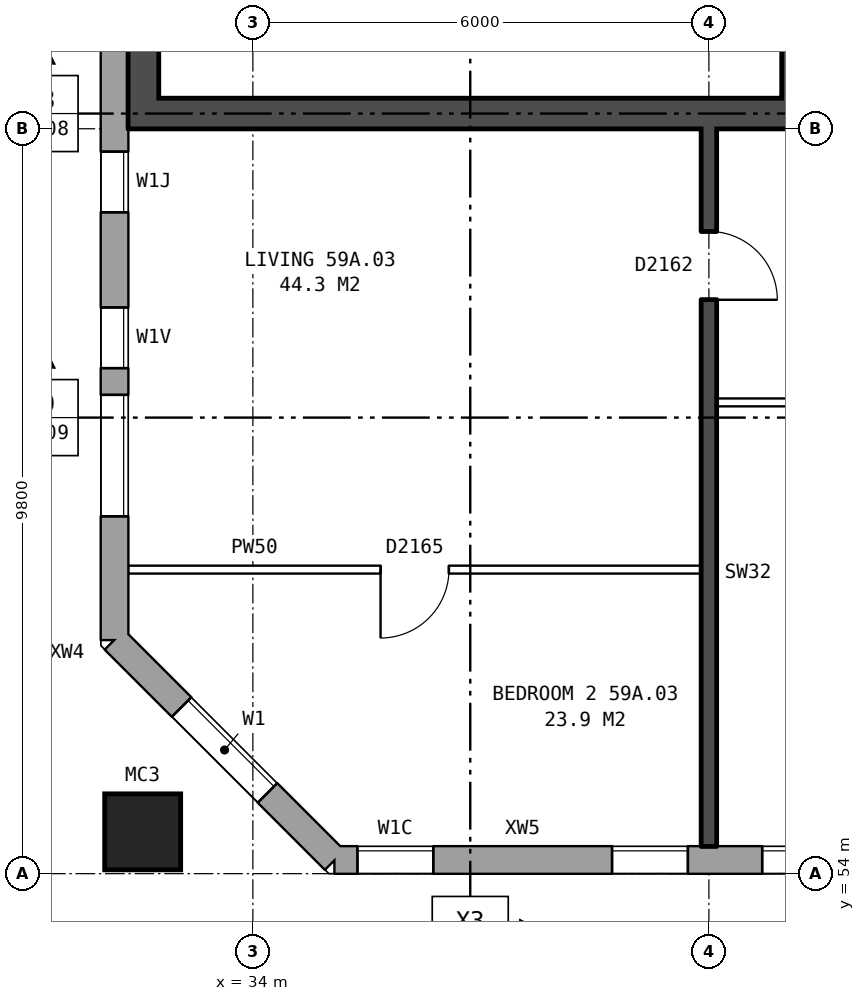
"""IFC4 building model, lengths in metres.
Left out: names, types, materials, properties, quantities, classifications, styles, units other than length and angle.
Written with IfcOpenShell. Run it as: python <this file> out.ifc"""

import sys

from ifc_helpers import new_model, si_unit, direction, frame, frame_2d, origin, origin_2d, place, context, subcontext, project, spatial, rectangle, hollow_rectangle, extrude, element, fill, save


model = new_model("IFC4")
c1 = context("Model", 3, precision=1e-05, world=origin(), true_north=direction((0.0, 1.0)))
c2 = subcontext(c1, "Body", "Model", "MODEL_VIEW")
j1 = project(units=[si_unit("LENGTHUNIT", "METRE"), si_unit("PLANEANGLEUNIT", "RADIAN")], contexts=[c1])
p1 = place(None, origin())
s1 = spatial("IfcSite", under=j1, at=p1, CompositionType="ELEMENT")
p2 = place(p1, origin())
s2 = spatial("IfcBuilding", under=s1, at=p2, CompositionType="ELEMENT")
p3 = place(p2, frame((0.0, 0.0, 209.0)))
s3 = spatial("IfcBuildingStorey", under=s2, at=p3, CompositionType="ELEMENT", Elevation=209.0)
p4 = place(p3, frame((32.55, 54.55, 0.0), z_axis=(0.0, 0.0, 1.0), x_axis=(1.0, 0.0, 0.0)))
e1 = element("IfcColumn", 1, at=p4, inside=s3, PredefinedType="COLUMN", context=c2, shape_type="SweptSolid", body=[
    extrude(hollow_rectangle(XDim=1.0, YDim=1.0, WallThickness=0.055, at=origin_2d()), origin(), (0.0, 0.0, 1.0), 3.1),
])
p5 = place(p3, frame((32.18, 57.075, 0.0), z_axis=(0.0, 0.0, 1.0), x_axis=(0.707106781187, -0.707106781187, 0.0)))
e2 = element("IfcWall", 2, at=p5, inside=s3, PredefinedType="STANDARD", context=c2, shape_type="SweptSolid", body=[
    extrude(rectangle(XDim=4.094, YDim=0.36, at=frame_2d((2.047, 0.0))), origin(), (0.0, 0.0, 1.0), 2.85),
])
p6 = place(p5, frame((1.247, 0.0, 0.8)))
e3 = element("IfcOpeningElement", 3, at=p6, cuts=e2, PredefinedType="OPENING", context=c2, shape_type="SweptSolid", body=[
    extrude(rectangle(XDim=1.6, YDim=1.8, at=frame_2d((0.8, 0.9))), frame((0.0, 0.19, 0.0), z_axis=(0.0, -1.0, 0.0), x_axis=(1.0, 0.0, 0.0)), (0.0, 0.0, 1.0), 0.38),
])
p7 = place(p3, frame((35.075, 54.18, 0.0), z_axis=(0.0, 0.0, 1.0), x_axis=(1.0, 0.0, 0.0)))
e4 = element("IfcWall", 4, at=p7, inside=s3, PredefinedType="STANDARD", context=c2, shape_type="SweptSolid", body=[
    extrude(rectangle(XDim=39.875, YDim=0.36, at=frame_2d((19.938, 0.0))), origin(), (0.0, 0.0, 1.0), 2.85),
])
p8 = place(p7, frame((0.3, 0.0, 0.8)))
e5 = element("IfcOpeningElement", 5, at=p8, cuts=e4, PredefinedType="OPENING", context=c2, shape_type="SweptSolid", body=[
    extrude(rectangle(XDim=1.0, YDim=1.8, at=frame_2d((0.5, 0.9))), frame((0.0, 0.19, 0.0), z_axis=(0.0, -1.0, 0.0), x_axis=(1.0, 0.0, 0.0)), (0.0, 0.0, 1.0), 0.38),
])
p9 = place(p7, frame((5.625, 0.0, 0.8)))
e6 = element("IfcOpeningElement", 6, at=p9, cuts=e4, PredefinedType="OPENING", context=c2, shape_type="SweptSolid", body=[
    extrude(rectangle(XDim=1.6, YDim=1.8, at=frame_2d((0.8, 0.9))), frame((0.0, 0.19, 0.0), z_axis=(0.0, -1.0, 0.0), x_axis=(1.0, 0.0, 0.0)), (0.0, 0.0, 1.0), 0.38),
])
p10 = place(p7, frame((8.625, 0.0, 0.8)))
e7 = element("IfcOpeningElement", 7, at=p10, cuts=e4, PredefinedType="OPENING", context=c2, shape_type="SweptSolid", body=[
    extrude(rectangle(XDim=1.6, YDim=1.8, at=frame_2d((0.8, 0.9))), frame((0.0, 0.19, 0.0), z_axis=(0.0, -1.0, 0.0), x_axis=(1.0, 0.0, 0.0)), (0.0, 0.0, 1.0), 0.38),
])
p11 = place(p7, frame((11.625, 0.0, 0.8)))
e8 = element("IfcOpeningElement", 8, at=p11, cuts=e4, PredefinedType="OPENING", context=c2, shape_type="SweptSolid", body=[
    extrude(rectangle(XDim=1.6, YDim=1.8, at=frame_2d((0.8, 0.9))), frame((0.0, 0.19, 0.0), z_axis=(0.0, -1.0, 0.0), x_axis=(1.0, 0.0, 0.0)), (0.0, 0.0, 1.0), 0.38),
])
p12 = place(p7, frame((14.625, 0.0, 0.8)))
e9 = element("IfcOpeningElement", 9, at=p12, cuts=e4, PredefinedType="OPENING", context=c2, shape_type="SweptSolid", body=[
    extrude(rectangle(XDim=1.6, YDim=1.8, at=frame_2d((0.8, 0.9))), frame((0.0, 0.19, 0.0), z_axis=(0.0, -1.0, 0.0), x_axis=(1.0, 0.0, 0.0)), (0.0, 0.0, 1.0), 0.38),
])
p13 = place(p7, frame((17.625, 0.0, 0.8)))
e10 = element("IfcOpeningElement", 10, at=p13, cuts=e4, PredefinedType="OPENING", context=c2, shape_type="SweptSolid", body=[
    extrude(rectangle(XDim=1.6, YDim=1.8, at=frame_2d((0.8, 0.9))), frame((0.0, 0.19, 0.0), z_axis=(0.0, -1.0, 0.0), x_axis=(1.0, 0.0, 0.0)), (0.0, 0.0, 1.0), 0.38),
])
p14 = place(p7, frame((20.625, 0.0, 0.8)))
e11 = element("IfcOpeningElement", 11, at=p14, cuts=e4, PredefinedType="OPENING", context=c2, shape_type="SweptSolid", body=[
    extrude(rectangle(XDim=1.6, YDim=1.8, at=frame_2d((0.8, 0.9))), frame((0.0, 0.19, 0.0), z_axis=(0.0, -1.0, 0.0), x_axis=(1.0, 0.0, 0.0)), (0.0, 0.0, 1.0), 0.38),
])
p15 = place(p7, frame((23.625, 0.0, 0.8)))
e12 = element("IfcOpeningElement", 12, at=p15, cuts=e4, PredefinedType="OPENING", context=c2, shape_type="SweptSolid", body=[
    extrude(rectangle(XDim=1.6, YDim=1.8, at=frame_2d((0.8, 0.9))), frame((0.0, 0.19, 0.0), z_axis=(0.0, -1.0, 0.0), x_axis=(1.0, 0.0, 0.0)), (0.0, 0.0, 1.0), 0.38),
])
p16 = place(p7, frame((26.625, 0.0, 0.8)))
e13 = element("IfcOpeningElement", 13, at=p16, cuts=e4, PredefinedType="OPENING", context=c2, shape_type="SweptSolid", body=[
    extrude(rectangle(XDim=1.6, YDim=1.8, at=frame_2d((0.8, 0.9))), frame((0.0, 0.19, 0.0), z_axis=(0.0, -1.0, 0.0), x_axis=(1.0, 0.0, 0.0)), (0.0, 0.0, 1.0), 0.38),
])
p17 = place(p7, frame((29.625, 0.0, 0.8)))
e14 = element("IfcOpeningElement", 14, at=p17, cuts=e4, PredefinedType="OPENING", context=c2, shape_type="SweptSolid", body=[
    extrude(rectangle(XDim=1.6, YDim=1.8, at=frame_2d((0.8, 0.9))), frame((0.0, 0.19, 0.0), z_axis=(0.0, -1.0, 0.0), x_axis=(1.0, 0.0, 0.0)), (0.0, 0.0, 1.0), 0.38),
])
p18 = place(p7, frame((32.625, 0.0, 0.8)))
e15 = element("IfcOpeningElement", 15, at=p18, cuts=e4, PredefinedType="OPENING", context=c2, shape_type="SweptSolid", body=[
    extrude(rectangle(XDim=1.6, YDim=1.8, at=frame_2d((0.8, 0.9))), frame((0.0, 0.19, 0.0), z_axis=(0.0, -1.0, 0.0), x_axis=(1.0, 0.0, 0.0)), (0.0, 0.0, 1.0), 0.38),
])
p19 = place(p7, frame((36.325, 0.0, 1.1)))
e16 = element("IfcOpeningElement", 16, at=p19, cuts=e4, PredefinedType="OPENING", context=c2, shape_type="SweptSolid", body=[
    extrude(rectangle(XDim=0.8, YDim=1.5, at=frame_2d((0.4, 0.75))), frame((0.0, 0.19, 0.0), z_axis=(0.0, -1.0, 0.0), x_axis=(1.0, 0.0, 0.0)), (0.0, 0.0, 1.0), 0.38),
])
p20 = place(p7, frame((3.65, 0.0, 0.8)))
e17 = element("IfcOpeningElement", 17, at=p20, cuts=e4, PredefinedType="OPENING", context=c2, shape_type="SweptSolid", body=[
    extrude(rectangle(XDim=1.0, YDim=1.8, at=frame_2d((0.5, 0.9))), frame((0.0, 0.19, 0.0), z_axis=(0.0, -1.0, 0.0), x_axis=(1.0, 0.0, 0.0)), (0.0, 0.0, 1.0), 0.38),
])
p21 = place(p7, frame((37.425, 0.0, 0.8)))
e18 = element("IfcOpeningElement", 18, at=p21, cuts=e4, PredefinedType="OPENING", context=c2, shape_type="SweptSolid", body=[
    extrude(rectangle(XDim=1.4, YDim=1.8, at=frame_2d((0.7, 0.9))), frame((0.0, 0.19, 0.0), z_axis=(0.0, -1.0, 0.0), x_axis=(1.0, 0.0, 0.0)), (0.0, 0.0, 1.0), 0.38),
])
p22 = place(p3, frame((32.18, 82.925, 0.0), z_axis=(0.0, 0.0, 1.0), x_axis=(0.0, -1.0, 0.0)))
e19 = element("IfcWall", 19, at=p22, inside=s3, PredefinedType="STANDARD", context=c2, shape_type="SweptSolid", body=[
    extrude(rectangle(XDim=25.851, YDim=0.36, at=frame_2d((12.925, 0.0))), origin(), (0.0, 0.0, 1.0), 2.85),
])
p23 = place(p22, frame((1.625, 0.0, 0.8)))
e20 = element("IfcOpeningElement", 20, at=p23, cuts=e19, PredefinedType="OPENING", context=c2, shape_type="SweptSolid", body=[
    extrude(rectangle(XDim=1.6, YDim=1.8, at=frame_2d((0.8, 0.9))), frame((0.0, 0.19, 0.0), z_axis=(0.0, -1.0, 0.0), x_axis=(1.0, 0.0, 0.0)), (0.0, 0.0, 1.0), 0.38),
])
p24 = place(p22, frame((4.475, 0.0, 0.15)))
e21 = element("IfcOpeningElement", 21, at=p24, cuts=e19, PredefinedType="OPENING", context=c2, shape_type="SweptSolid", body=[
    extrude(rectangle(XDim=0.6, YDim=0.9, at=frame_2d((0.3, 0.45))), frame((0.0, 0.19, 0.0), z_axis=(0.0, -1.0, 0.0), x_axis=(1.0, 0.0, 0.0)), (0.0, 0.0, 1.0), 0.38),
])
p25 = place(p22, frame((19.425, 0.0, 0.8)))
e22 = element("IfcOpeningElement", 22, at=p25, cuts=e19, PredefinedType="OPENING", context=c2, shape_type="SweptSolid", body=[
    extrude(rectangle(XDim=0.8, YDim=1.5, at=frame_2d((0.4, 0.75))), frame((0.0, 0.19, 0.0), z_axis=(0.0, -1.0, 0.0), x_axis=(1.0, 0.0, 0.0)), (0.0, 0.0, 1.0), 0.38),
])
p26 = place(p22, frame((22.625, 0.0, 0.8)))
e23 = element("IfcOpeningElement", 23, at=p26, cuts=e19, PredefinedType="OPENING", context=c2, shape_type="SweptSolid", body=[
    extrude(rectangle(XDim=1.6, YDim=1.8, at=frame_2d((0.8, 0.9))), frame((0.0, 0.19, 0.0), z_axis=(0.0, -1.0, 0.0), x_axis=(1.0, 0.0, 0.0)), (0.0, 0.0, 1.0), 0.38),
])
p27 = place(p22, frame((5.375, 0.0, 0.15)))
e24 = element("IfcOpeningElement", 24, at=p27, cuts=e19, PredefinedType="OPENING", context=c2, shape_type="SweptSolid", body=[
    extrude(rectangle(XDim=1.0, YDim=1.8, at=frame_2d((0.5, 0.9))), frame((0.0, 0.19, 0.0), z_axis=(0.0, -1.0, 0.0), x_axis=(1.0, 0.0, 0.0)), (0.0, 0.0, 1.0), 0.38),
])
p28 = place(p22, frame((21.475, 0.0, 1.7)))
e25 = element("IfcOpeningElement", 25, at=p28, cuts=e19, PredefinedType="OPENING", context=c2, shape_type="SweptSolid", body=[
    extrude(rectangle(XDim=0.8, YDim=0.9, at=frame_2d((0.4, 0.45))), frame((0.0, 0.19, 0.0), z_axis=(0.0, -1.0, 0.0), x_axis=(1.0, 0.0, 0.0)), (0.0, 0.0, 1.0), 0.38),
])
p29 = place(p3, frame((41.16, 76.2, 0.0), z_axis=(0.0, 0.0, 1.0), x_axis=(0.0, -1.0, 0.0)))
e26 = element("IfcWall", 26, at=p29, inside=s3, PredefinedType="SHEAR", context=c2, shape_type="SweptSolid", body=[
    extrude(rectangle(XDim=12.4, YDim=0.4, at=frame_2d((6.2, 0.0))), origin(), (0.0, 0.0, 1.0), 2.85),
])
p30 = place(p29, frame((1.325, 0.0, 0.0)))
e27 = element("IfcOpeningElement", 27, at=p30, cuts=e26, PredefinedType="OPENING", context=c2, shape_type="SweptSolid", body=[
    extrude(rectangle(XDim=1.1, YDim=2.1, at=frame_2d((0.55, 1.05))), frame((0.0, 0.21, 0.0), z_axis=(0.0, -1.0, 0.0), x_axis=(1.0, 0.0, 0.0)), (0.0, 0.0, 1.0), 0.42),
])
p31 = place(p29, frame((4.575, 0.0, 0.0)))
e28 = element("IfcOpeningElement", 28, at=p31, cuts=e26, PredefinedType="OPENING", context=c2, shape_type="SweptSolid", body=[
    extrude(rectangle(XDim=0.85, YDim=2.1, at=frame_2d((0.425, 1.05))), frame((0.0, 0.21, 0.0), z_axis=(0.0, -1.0, 0.0), x_axis=(1.0, 0.0, 0.0)), (0.0, 0.0, 1.0), 0.42),
])
p32 = place(p29, frame((7.825, 0.0, 0.0)))
e29 = element("IfcOpeningElement", 29, at=p32, cuts=e26, PredefinedType="OPENING", context=c2, shape_type="SweptSolid", body=[
    extrude(rectangle(XDim=0.85, YDim=2.1, at=frame_2d((0.425, 1.05))), frame((0.0, 0.21, 0.0), z_axis=(0.0, -1.0, 0.0), x_axis=(1.0, 0.0, 0.0)), (0.0, 0.0, 1.0), 0.42),
])
p33 = place(p29, frame((9.9, 0.0, 0.0)))
e30 = element("IfcOpeningElement", 30, at=p33, cuts=e26, PredefinedType="OPENING", context=c2, shape_type="SweptSolid", body=[
    extrude(rectangle(XDim=1.1, YDim=2.1, at=frame_2d((0.55, 1.05))), frame((0.0, 0.21, 0.0), z_axis=(0.0, -1.0, 0.0), x_axis=(1.0, 0.0, 0.0)), (0.0, 0.0, 1.0), 0.42),
])
p34 = place(p3, frame((32.56, 76.2, 0.0), z_axis=(0.0, 0.0, 1.0), x_axis=(0.0, -1.0, 0.0)))
e31 = element("IfcWall", 31, at=p34, inside=s3, PredefinedType="SHEAR", context=c2, shape_type="SweptSolid", body=[
    extrude(rectangle(XDim=12.4, YDim=0.4, at=frame_2d((6.2, 0.0))), origin(), (0.0, 0.0, 1.0), 2.85),
])
p35 = place(p3, frame((40.96, 64.0, 0.0), z_axis=(0.0, 0.0, 1.0), x_axis=(-1.0, 0.0, 0.0)))
e32 = element("IfcWall", 32, at=p35, inside=s3, PredefinedType="SHEAR", context=c2, shape_type="SweptSolid", body=[
    extrude(rectangle(XDim=8.2, YDim=0.4, at=frame_2d((4.1, 0.0))), origin(), (0.0, 0.0, 1.0), 2.85),
])
p36 = place(p3, frame((32.36, 58.0, 0.0), z_axis=(0.0, 0.0, 1.0), x_axis=(1.0, 0.0, 0.0)))
e33 = element("IfcWall", 33, at=p36, inside=s3, PredefinedType="PARTITIONING", context=c2, shape_type="SweptSolid", body=[
    extrude(rectangle(XDim=7.54, YDim=0.1, at=frame_2d((3.77, 0.0))), origin(), (0.0, 0.0, 1.0), 2.85),
])
p37 = place(p36, frame((3.32, 0.0, 0.0)))
e34 = element("IfcOpeningElement", 34, at=p37, cuts=e33, PredefinedType="OPENING", context=c2, shape_type="SweptSolid", body=[
    extrude(rectangle(XDim=0.9, YDim=2.1, at=frame_2d((0.45, 1.05))), frame((0.0, 0.06, 0.0), z_axis=(0.0, -1.0, 0.0), x_axis=(1.0, 0.0, 0.0)), (0.0, 0.0, 1.0), 0.12),
])
p38 = place(p3, frame((40.1, 60.2, 0.0), z_axis=(0.0, 0.0, 1.0), x_axis=(1.0, 0.0, 0.0)))
e35 = element("IfcWall", 35, at=p38, inside=s3, PredefinedType="PARTITIONING", context=c2, shape_type="SweptSolid", body=[
    extrude(rectangle(XDim=5.8, YDim=0.1, at=frame_2d((2.9, 0.0))), origin(), (0.0, 0.0, 1.0), 2.85),
])
p39 = place(p38, frame((1.3, 0.0, 0.0)))
e36 = element("IfcOpeningElement", 36, at=p39, cuts=e35, PredefinedType="OPENING", context=c2, shape_type="SweptSolid", body=[
    extrude(rectangle(XDim=0.9, YDim=2.1, at=frame_2d((0.45, 1.05))), frame((0.0, 0.06, 0.0), z_axis=(0.0, -1.0, 0.0), x_axis=(1.0, 0.0, 0.0)), (0.0, 0.0, 1.0), 0.12),
])
p40 = place(p38, frame((4.2, 0.0, 0.0)))
e37 = element("IfcOpeningElement", 37, at=p40, cuts=e35, PredefinedType="OPENING", context=c2, shape_type="SweptSolid", body=[
    extrude(rectangle(XDim=0.9, YDim=2.1, at=frame_2d((0.45, 1.05))), frame((0.0, 0.06, 0.0), z_axis=(0.0, -1.0, 0.0), x_axis=(1.0, 0.0, 0.0)), (0.0, 0.0, 1.0), 0.12),
])
p41 = place(p3, frame((40.0, 54.36, 0.0), z_axis=(0.0, 0.0, 1.0), x_axis=(0.0, 1.0, 0.0)))
e38 = element("IfcWall", 38, at=p41, inside=s3, PredefinedType="SOLIDWALL", context=c2, shape_type="SweptSolid", body=[
    extrude(rectangle(XDim=9.44, YDim=0.2, at=frame_2d((4.72, 0.0))), origin(), (0.0, 0.0, 1.0), 2.85),
])
p42 = place(p41, frame((7.19, 0.0, 0.0)))
e39 = element("IfcOpeningElement", 39, at=p42, cuts=e38, PredefinedType="OPENING", context=c2, shape_type="SweptSolid", body=[
    extrude(rectangle(XDim=0.9, YDim=2.1, at=frame_2d((0.45, 1.05))), frame((0.0, 0.11, 0.0), z_axis=(0.0, -1.0, 0.0), x_axis=(1.0, 0.0, 0.0)), (0.0, 0.0, 1.0), 0.22),
])
p43 = place(p6, origin())
e40 = element("IfcWindow", 40, at=p43, inside=s3, PartitioningType="SINGLE_PANEL", PredefinedType="WINDOW", context=c2, shape_type="SweptSolid", body=[
    extrude(rectangle(XDim=1.6, YDim=1.8, at=frame_2d((0.8, 0.9))), frame((0.0, 0.15, 0.0), z_axis=(0.0, -1.0, 0.0), x_axis=(1.0, 0.0, 0.0)), (0.0, 0.0, 1.0), 0.06),
])
fill(e3, e40)
p44 = place(p8, origin())
e41 = element("IfcWindow", 41, at=p44, inside=s3, PartitioningType="SINGLE_PANEL", PredefinedType="WINDOW", context=c2, shape_type="SweptSolid", body=[
    extrude(rectangle(XDim=1.0, YDim=1.8, at=frame_2d((0.5, 0.9))), frame((0.0, 0.15, 0.0), z_axis=(0.0, -1.0, 0.0), x_axis=(1.0, 0.0, 0.0)), (0.0, 0.0, 1.0), 0.06),
])
fill(e5, e41)
p45 = place(p9, origin())
e42 = element("IfcWindow", 42, at=p45, inside=s3, PartitioningType="SINGLE_PANEL", PredefinedType="WINDOW", context=c2, shape_type="SweptSolid", body=[
    extrude(rectangle(XDim=1.6, YDim=1.8, at=frame_2d((0.8, 0.9))), frame((0.0, 0.15, 0.0), z_axis=(0.0, -1.0, 0.0), x_axis=(1.0, 0.0, 0.0)), (0.0, 0.0, 1.0), 0.06),
])
fill(e6, e42)
p46 = place(p25, origin())
e43 = element("IfcWindow", 43, at=p46, inside=s3, PartitioningType="SINGLE_PANEL", PredefinedType="WINDOW", context=c2, shape_type="SweptSolid", body=[
    extrude(rectangle(XDim=0.8, YDim=1.5, at=frame_2d((0.4, 0.75))), frame((0.0, 0.15, 0.0), z_axis=(0.0, -1.0, 0.0), x_axis=(1.0, 0.0, 0.0)), (0.0, 0.0, 1.0), 0.06),
])
fill(e22, e43)
p47 = place(p26, origin())
e44 = element("IfcWindow", 44, at=p47, inside=s3, PartitioningType="SINGLE_PANEL", PredefinedType="WINDOW", context=c2, shape_type="SweptSolid", body=[
    extrude(rectangle(XDim=1.6, YDim=1.8, at=frame_2d((0.8, 0.9))), frame((0.0, 0.15, 0.0), z_axis=(0.0, -1.0, 0.0), x_axis=(1.0, 0.0, 0.0)), (0.0, 0.0, 1.0), 0.06),
])
fill(e23, e44)
p48 = place(p37, frame((0.9, 0.0, 0.0), z_axis=(0.0, 0.0, 1.0), x_axis=(-1.0, 0.0, 0.0)))
e45 = element("IfcDoor", 45, at=p48, inside=s3, OperationType="SINGLE_SWING_RIGHT", PredefinedType="DOOR", context=c2, shape_type="SweptSolid", body=[
    extrude(rectangle(XDim=0.9, YDim=2.1, at=frame_2d((0.45, 1.05))), frame((0.0, 0.025, 0.0), z_axis=(0.0, -1.0, 0.0), x_axis=(1.0, 0.0, 0.0)), (0.0, 0.0, 1.0), 0.05),
])
fill(e34, e45)
p49 = place(p42, frame((0.9, 0.0, 0.0), z_axis=(0.0, 0.0, 1.0), x_axis=(-1.0, 0.0, 0.0)))
e46 = element("IfcDoor", 46, at=p49, inside=s3, OperationType="SINGLE_SWING_RIGHT", PredefinedType="DOOR", context=c2, shape_type="SweptSolid", body=[
    extrude(rectangle(XDim=0.9, YDim=2.1, at=frame_2d((0.45, 1.05))), frame((0.0, 0.025, 0.0), z_axis=(0.0, -1.0, 0.0), x_axis=(1.0, 0.0, 0.0)), (0.0, 0.0, 1.0), 0.05),
])
fill(e39, e46)
p50 = place(p20, origin())
e47 = element("IfcWindow", 47, at=p50, inside=s3, PartitioningType="SINGLE_PANEL", PredefinedType="WINDOW", context=c2, shape_type="SweptSolid", body=[
    extrude(rectangle(XDim=1.0, YDim=1.8, at=frame_2d((0.5, 0.9))), frame((0.0, 0.15, 0.0), z_axis=(0.0, -1.0, 0.0), x_axis=(1.0, 0.0, 0.0)), (0.0, 0.0, 1.0), 0.06),
])
fill(e17, e47)
p51 = place(p28, origin())
e48 = element("IfcWindow", 48, at=p51, inside=s3, PartitioningType="SINGLE_PANEL", PredefinedType="WINDOW", context=c2, shape_type="SweptSolid", body=[
    extrude(rectangle(XDim=0.8, YDim=0.9, at=frame_2d((0.4, 0.45))), frame((0.0, 0.15, 0.0), z_axis=(0.0, -1.0, 0.0), x_axis=(1.0, 0.0, 0.0)), (0.0, 0.0, 1.0), 0.06),
])
fill(e25, e48)
save(model, sys.argv[1])
